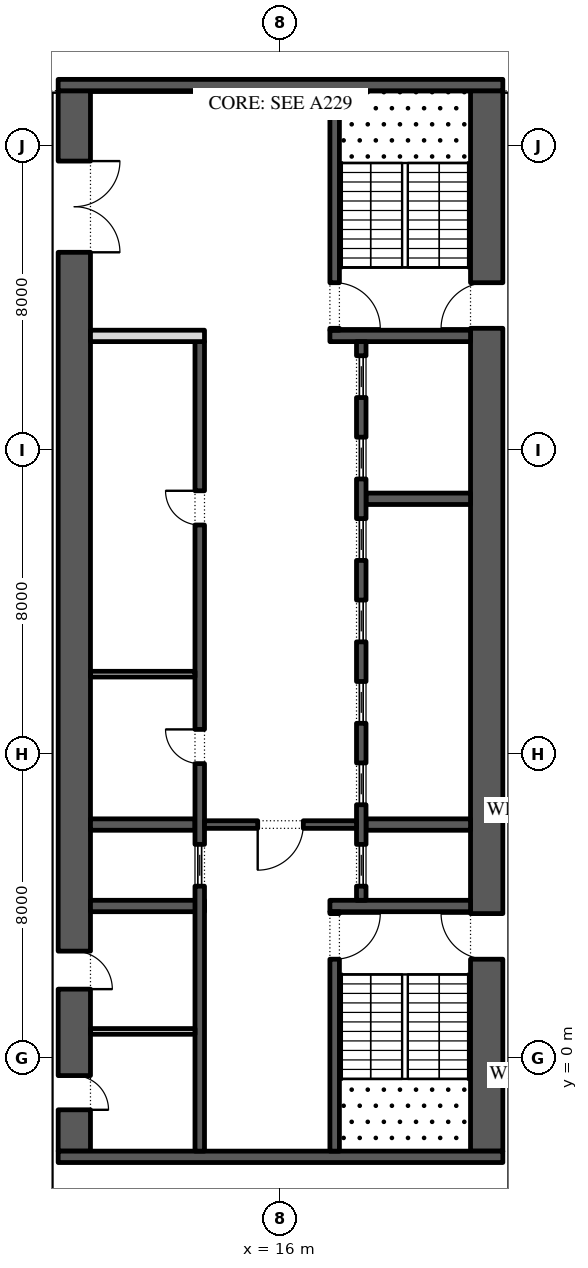
"""IFC4 building model, lengths in metres.
Left out: names, types, materials, properties, quantities, classifications, styles, units other than length and angle.
Written with IfcOpenShell. Run it as: python <this file> out.ifc"""

import sys

from ifc_helpers import new_model, si_unit, direction, frame, frame_2d, origin, place, context, subcontext, project, spatial, rectangle, extrude, element, fill, save


model = new_model("IFC4")
c1 = context("Model", 3, precision=1e-05, world=origin(), true_north=direction((0.0, 1.0)))
c2 = subcontext(c1, "Body", "Model", "MODEL_VIEW")
j1 = project(units=[si_unit("LENGTHUNIT", "METRE"), si_unit("PLANEANGLEUNIT", "RADIAN")], contexts=[c1])
p1 = place(None, origin())
s1 = spatial("IfcSite", under=j1, at=p1, CompositionType="ELEMENT")
p2 = place(p1, origin())
s2 = spatial("IfcBuilding", under=s1, at=p2, CompositionType="ELEMENT")
p3 = place(p2, frame((0.0, 0.0, 122.4)))
s3 = spatial("IfcBuildingStorey", under=s2, at=p3, CompositionType="ELEMENT", Elevation=122.4)
p4 = place(p3, frame((21.425, -2.45, 0.0), z_axis=(0.0, 0.0, 1.0), x_axis=(0.0, 1.0, 0.0)))
e1 = element("IfcWall", 1, at=p4, inside=s3, PredefinedType="SHEAR", context=c2, shape_type="SweptSolid", body=[
    extrude(rectangle(XDim=27.9, YDim=0.85, at=frame_2d((13.95, 0.0))), origin(), (0.0, 0.0, 1.0), 4.0),
])
p5 = place(p4, frame((5.05, 0.0, 0.0)))
e2 = element("IfcOpeningElement", 2, at=p5, cuts=e1, PredefinedType="OPENING", context=c2, shape_type="SweptSolid", body=[
    extrude(rectangle(XDim=1.2, YDim=2.1, at=frame_2d((0.6, 1.05))), frame((0.0, 0.435, 0.0), z_axis=(0.0, -1.0, 0.0), x_axis=(1.0, 0.0, 0.0)), (0.0, 0.0, 1.0), 0.87),
])
p6 = place(p4, frame((21.65, 0.0, 0.0)))
e3 = element("IfcOpeningElement", 3, at=p6, cuts=e1, PredefinedType="OPENING", context=c2, shape_type="SweptSolid", body=[
    extrude(rectangle(XDim=1.2, YDim=2.1, at=frame_2d((0.6, 1.05))), frame((0.0, 0.435, 0.0), z_axis=(0.0, -1.0, 0.0), x_axis=(1.0, 0.0, 0.0)), (0.0, 0.0, 1.0), 0.87),
])
p7 = place(p3, frame((10.575, -2.45, 0.0), z_axis=(0.0, 0.0, 1.0), x_axis=(0.0, 1.0, 0.0)))
e4 = element("IfcWall", 4, at=p7, inside=s3, PredefinedType="SHEAR", context=c2, shape_type="SweptSolid", body=[
    extrude(rectangle(XDim=27.9, YDim=0.85, at=frame_2d((13.95, 0.0))), origin(), (0.0, 0.0, 1.0), 4.0),
])
p8 = place(p7, frame((23.65, 0.0, 0.0)))
e5 = element("IfcOpeningElement", 5, at=p8, cuts=e4, PredefinedType="OPENING", context=c2, shape_type="SweptSolid", body=[
    extrude(rectangle(XDim=2.4, YDim=2.1, at=frame_2d((1.2, 1.05))), frame((0.0, 0.435, 0.0), z_axis=(0.0, -1.0, 0.0), x_axis=(1.0, 0.0, 0.0)), (0.0, 0.0, 1.0), 0.87),
])
p9 = place(p7, frame((1.087, 0.0, 0.0)))
e6 = element("IfcOpeningElement", 6, at=p9, cuts=e4, PredefinedType="OPENING", context=c2, shape_type="SweptSolid", body=[
    extrude(rectangle(XDim=0.9, YDim=2.1, at=frame_2d((0.45, 1.05))), frame((0.0, 0.435, 0.0), z_axis=(0.0, -1.0, 0.0), x_axis=(1.0, 0.0, 0.0)), (0.0, 0.0, 1.0), 0.87),
])
p10 = place(p7, frame((4.262, 0.0, 0.0)))
e7 = element("IfcOpeningElement", 7, at=p10, cuts=e4, PredefinedType="OPENING", context=c2, shape_type="SweptSolid", body=[
    extrude(rectangle(XDim=1.0, YDim=2.1, at=frame_2d((0.5, 1.05))), frame((0.0, 0.435, 0.0), z_axis=(0.0, -1.0, 0.0), x_axis=(1.0, 0.0, 0.0)), (0.0, 0.0, 1.0), 0.87),
])
for number, where, z_axis, x_axis in (
    (8, (10.15, -2.6, 0.0), (0.0, 0.0, 1.0), (1.0, 0.0, 0.0)),
    (9, (10.15, 25.6, 0.0), (0.0, 0.0, 1.0), (1.0, 0.0, 0.0)),
):
    element("IfcWall", number, at=place(p3, frame(where, z_axis=z_axis, x_axis=x_axis)), inside=s3, PredefinedType="SHEAR", context=c2, shape_type="SweptSolid", body=[
        extrude(rectangle(XDim=11.7, YDim=0.3, at=frame_2d((5.85, 0.0))), origin(), (0.0, 0.0, 1.0), 4.0),
    ])
p11 = place(p3, frame((17.3, 4.0, 0.0), z_axis=(0.0, 0.0, 1.0), x_axis=(1.0, 0.0, 0.0)))
e10 = element("IfcWall", 10, at=p11, inside=s3, PredefinedType="SHEAR", context=c2, shape_type="SweptSolid", body=[
    extrude(rectangle(XDim=3.7, YDim=0.3, at=frame_2d((1.85, 0.0))), origin(), (0.0, 0.0, 1.0), 4.0),
])
p12 = place(p3, frame((17.425, -2.45, 0.0), z_axis=(0.0, 0.0, 1.0), x_axis=(0.0, 1.0, 0.0)))
e11 = element("IfcWall", 11, at=p12, inside=s3, PredefinedType="SHEAR", context=c2, shape_type="SweptSolid", body=[
    extrude(rectangle(XDim=6.3, YDim=0.25, at=frame_2d((3.15, 0.0))), origin(), (0.0, 0.0, 1.0), 4.0),
])
p13 = place(p12, frame((5.05, 0.0, 0.0)))
e12 = element("IfcOpeningElement", 12, at=p13, cuts=e11, PredefinedType="OPENING", context=c2, shape_type="SweptSolid", body=[
    extrude(rectangle(XDim=1.2, YDim=2.1, at=frame_2d((0.6, 1.05))), frame((0.0, 0.135, 0.0), z_axis=(0.0, -1.0, 0.0), x_axis=(1.0, 0.0, 0.0)), (0.0, 0.0, 1.0), 0.27),
])
p14 = place(p3, frame((17.3, 19.0, 0.0), z_axis=(0.0, 0.0, 1.0), x_axis=(1.0, 0.0, 0.0)))
e13 = element("IfcWall", 13, at=p14, inside=s3, PredefinedType="SHEAR", context=c2, shape_type="SweptSolid", body=[
    extrude(rectangle(XDim=3.7, YDim=0.3, at=frame_2d((1.85, 0.0))), origin(), (0.0, 0.0, 1.0), 4.0),
])
p15 = place(p3, frame((17.425, 19.15, 0.0), z_axis=(0.0, 0.0, 1.0), x_axis=(0.0, 1.0, 0.0)))
e14 = element("IfcWall", 14, at=p15, inside=s3, PredefinedType="SHEAR", context=c2, shape_type="SweptSolid", body=[
    extrude(rectangle(XDim=6.3, YDim=0.25, at=frame_2d((3.15, 0.0))), origin(), (0.0, 0.0, 1.0), 4.0),
])
p16 = place(p15, frame((0.05, 0.0, 0.0)))
e15 = element("IfcOpeningElement", 15, at=p16, cuts=e14, PredefinedType="OPENING", context=c2, shape_type="SweptSolid", body=[
    extrude(rectangle(XDim=1.2, YDim=2.1, at=frame_2d((0.6, 1.05))), frame((0.0, 0.135, 0.0), z_axis=(0.0, -1.0, 0.0), x_axis=(1.0, 0.0, 0.0)), (0.0, 0.0, 1.0), 0.27),
])
for number, where, z_axis, x_axis in (
    (16, (18.25, 6.143, 0.0), (0.0, 0.0, 1.0), (1.0, 0.0, 0.0)),
    (17, (18.25, 14.714, 0.0), (0.0, 0.0, 1.0), (1.0, 0.0, 0.0)),
):
    element("IfcWall", number, at=place(p3, frame(where, z_axis=z_axis, x_axis=x_axis)), inside=s3, PredefinedType="SHEAR", context=c2, shape_type="SweptSolid", body=[
        extrude(rectangle(XDim=2.75, YDim=0.3, at=frame_2d((1.375, 0.0))), origin(), (0.0, 0.0, 1.0), 4.0),
    ])
p17 = place(p3, frame((18.125, 4.15, 0.0), z_axis=(0.0, 0.0, 1.0), x_axis=(0.0, 1.0, 0.0)))
e18 = element("IfcWall", 18, at=p17, inside=s3, PredefinedType="SHEAR", context=c2, shape_type="SweptSolid", body=[
    extrude(rectangle(XDim=14.7, YDim=0.25, at=frame_2d((7.35, 0.0))), origin(), (0.0, 0.0, 1.0), 4.0),
])
p18 = place(p17, frame((0.371, 0.0, 0.0)))
e19 = element("IfcOpeningElement", 19, at=p18, cuts=e18, PredefinedType="OPENING", context=c2, shape_type="SweptSolid", body=[
    extrude(rectangle(XDim=1.1, YDim=2.1, at=frame_2d((0.55, 1.05))), frame((0.0, 0.135, 0.0), z_axis=(0.0, -1.0, 0.0), x_axis=(1.0, 0.0, 0.0)), (0.0, 0.0, 1.0), 0.27),
])
p19 = place(p17, frame((2.514, 0.0, 0.0)))
e20 = element("IfcOpeningElement", 20, at=p19, cuts=e18, PredefinedType="OPENING", context=c2, shape_type="SweptSolid", body=[
    extrude(rectangle(XDim=1.1, YDim=2.1, at=frame_2d((0.55, 1.05))), frame((0.0, 0.135, 0.0), z_axis=(0.0, -1.0, 0.0), x_axis=(1.0, 0.0, 0.0)), (0.0, 0.0, 1.0), 0.27),
])
p20 = place(p17, frame((4.657, 0.0, 0.0)))
e21 = element("IfcOpeningElement", 21, at=p20, cuts=e18, PredefinedType="OPENING", context=c2, shape_type="SweptSolid", body=[
    extrude(rectangle(XDim=1.1, YDim=2.1, at=frame_2d((0.55, 1.05))), frame((0.0, 0.135, 0.0), z_axis=(0.0, -1.0, 0.0), x_axis=(1.0, 0.0, 0.0)), (0.0, 0.0, 1.0), 0.27),
])
p21 = place(p17, frame((6.8, 0.0, 0.0)))
e22 = element("IfcOpeningElement", 22, at=p21, cuts=e18, PredefinedType="OPENING", context=c2, shape_type="SweptSolid", body=[
    extrude(rectangle(XDim=1.1, YDim=2.1, at=frame_2d((0.55, 1.05))), frame((0.0, 0.135, 0.0), z_axis=(0.0, -1.0, 0.0), x_axis=(1.0, 0.0, 0.0)), (0.0, 0.0, 1.0), 0.27),
])
p22 = place(p17, frame((8.943, 0.0, 0.0)))
e23 = element("IfcOpeningElement", 23, at=p22, cuts=e18, PredefinedType="OPENING", context=c2, shape_type="SweptSolid", body=[
    extrude(rectangle(XDim=1.1, YDim=2.1, at=frame_2d((0.55, 1.05))), frame((0.0, 0.135, 0.0), z_axis=(0.0, -1.0, 0.0), x_axis=(1.0, 0.0, 0.0)), (0.0, 0.0, 1.0), 0.27),
])
p23 = place(p17, frame((11.086, 0.0, 0.0)))
e24 = element("IfcOpeningElement", 24, at=p23, cuts=e18, PredefinedType="OPENING", context=c2, shape_type="SweptSolid", body=[
    extrude(rectangle(XDim=1.1, YDim=2.1, at=frame_2d((0.55, 1.05))), frame((0.0, 0.135, 0.0), z_axis=(0.0, -1.0, 0.0), x_axis=(1.0, 0.0, 0.0)), (0.0, 0.0, 1.0), 0.27),
])
p24 = place(p17, frame((13.229, 0.0, 0.0)))
e25 = element("IfcOpeningElement", 25, at=p24, cuts=e18, PredefinedType="OPENING", context=c2, shape_type="SweptSolid", body=[
    extrude(rectangle(XDim=1.1, YDim=2.1, at=frame_2d((0.55, 1.05))), frame((0.0, 0.135, 0.0), z_axis=(0.0, -1.0, 0.0), x_axis=(1.0, 0.0, 0.0)), (0.0, 0.0, 1.0), 0.27),
])
p25 = place(p3, frame((11.0, 4.0, 0.0), z_axis=(0.0, 0.0, 1.0), x_axis=(1.0, 0.0, 0.0)))
e26 = element("IfcWall", 26, at=p25, inside=s3, PredefinedType="SHEAR", context=c2, shape_type="SweptSolid", body=[
    extrude(rectangle(XDim=3.0, YDim=0.3, at=frame_2d((1.5, 0.0))), origin(), (0.0, 0.0, 1.0), 4.0),
])
p26 = place(p3, frame((11.0, 6.143, 0.0), z_axis=(0.0, 0.0, 1.0), x_axis=(1.0, 0.0, 0.0)))
e27 = element("IfcWall", 27, at=p26, inside=s3, PredefinedType="SHEAR", context=c2, shape_type="SweptSolid", body=[
    extrude(rectangle(XDim=2.75, YDim=0.3, at=frame_2d((1.375, 0.0))), origin(), (0.0, 0.0, 1.0), 4.0),
])
p27 = place(p3, frame((13.875, -2.45, 0.0), z_axis=(0.0, 0.0, 1.0), x_axis=(0.0, 1.0, 0.0)))
e28 = element("IfcWall", 28, at=p27, inside=s3, PredefinedType="SHEAR", context=c2, shape_type="SweptSolid", body=[
    extrude(rectangle(XDim=21.3, YDim=0.25, at=frame_2d((10.65, 0.0))), origin(), (0.0, 0.0, 1.0), 4.0),
])
p28 = place(p27, frame((10.196, 0.0, 0.0)))
e29 = element("IfcOpeningElement", 29, at=p28, cuts=e28, PredefinedType="OPENING", context=c2, shape_type="SweptSolid", body=[
    extrude(rectangle(XDim=0.9, YDim=2.1, at=frame_2d((0.45, 1.05))), frame((0.0, 0.135, 0.0), z_axis=(0.0, -1.0, 0.0), x_axis=(1.0, 0.0, 0.0)), (0.0, 0.0, 1.0), 0.27),
])
p29 = place(p27, frame((16.475, 0.0, 0.0)))
e30 = element("IfcOpeningElement", 30, at=p29, cuts=e28, PredefinedType="OPENING", context=c2, shape_type="SweptSolid", body=[
    extrude(rectangle(XDim=0.9, YDim=2.1, at=frame_2d((0.45, 1.05))), frame((0.0, 0.135, 0.0), z_axis=(0.0, -1.0, 0.0), x_axis=(1.0, 0.0, 0.0)), (0.0, 0.0, 1.0), 0.27),
])
p30 = place(p27, frame((6.971, 0.0, 0.0)))
e31 = element("IfcOpeningElement", 31, at=p30, cuts=e28, PredefinedType="OPENING", context=c2, shape_type="SweptSolid", body=[
    extrude(rectangle(XDim=1.1, YDim=2.1, at=frame_2d((0.55, 1.05))), frame((0.0, 0.135, 0.0), z_axis=(0.0, -1.0, 0.0), x_axis=(1.0, 0.0, 0.0)), (0.0, 0.0, 1.0), 0.27),
])
p31 = place(p3, frame((11.0, 19.0, 0.0), z_axis=(0.0, 0.0, 1.0), x_axis=(1.0, 0.0, 0.0)))
e32 = element("IfcWall", 32, at=p31, inside=s3, PredefinedType="PARTITIONING", context=c2, shape_type="SweptSolid", body=[
    extrude(rectangle(XDim=3.0, YDim=0.3, at=frame_2d((1.5, 0.0))), origin(), (0.0, 0.0, 1.0), 4.0),
])
p32 = place(p3, frame((11.0, 10.1, 0.0), z_axis=(0.0, 0.0, 1.0), x_axis=(1.0, 0.0, 0.0)))
e33 = element("IfcWall", 33, at=p32, inside=s3, PredefinedType="PARTITIONING", context=c2, shape_type="SweptSolid", body=[
    extrude(rectangle(XDim=2.75, YDim=0.15, at=frame_2d((1.375, 0.0))), origin(), (0.0, 0.0, 1.0), 4.0),
])
p33 = place(p3, frame((14.0, 6.143, 0.0), z_axis=(0.0, 0.0, 1.0), x_axis=(1.0, 0.0, 0.0)))
e34 = element("IfcWall", 34, at=p33, inside=s3, PredefinedType="SHEAR", context=c2, shape_type="SweptSolid", body=[
    extrude(rectangle(XDim=4.0, YDim=0.2, at=frame_2d((2.0, 0.0))), origin(), (0.0, 0.0, 1.0), 4.0),
])
p34 = place(p33, frame((1.4, 0.0, 0.0)))
e35 = element("IfcOpeningElement", 35, at=p34, cuts=e34, PredefinedType="OPENING", context=c2, shape_type="SweptSolid", body=[
    extrude(rectangle(XDim=1.2, YDim=2.1, at=frame_2d((0.6, 1.05))), frame((0.0, 0.11, 0.0), z_axis=(0.0, -1.0, 0.0), x_axis=(1.0, 0.0, 0.0)), (0.0, 0.0, 1.0), 0.22),
])
p35 = place(p3, frame((11.0, 0.7, 0.0), z_axis=(0.0, 0.0, 1.0), x_axis=(1.0, 0.0, 0.0)))
e36 = element("IfcWall", 36, at=p35, inside=s3, PredefinedType="PARTITIONING", context=c2, shape_type="SweptSolid", body=[
    extrude(rectangle(XDim=2.75, YDim=0.15, at=frame_2d((1.375, 0.0))), origin(), (0.0, 0.0, 1.0), 4.0),
])
p36 = place(p18, origin())
e37 = element("IfcDoor", 37, at=p36, inside=s3, OperationType="SLIDING_TO_LEFT", PredefinedType="DOOR", context=c2, shape_type="SweptSolid", body=[
    extrude(rectangle(XDim=1.1, YDim=2.1, at=frame_2d((0.55, 1.05))), frame((0.0, 0.025, 0.0), z_axis=(0.0, -1.0, 0.0), x_axis=(1.0, 0.0, 0.0)), (0.0, 0.0, 1.0), 0.05),
])
fill(e19, e37)
p37 = place(p19, origin())
e38 = element("IfcDoor", 38, at=p37, inside=s3, OperationType="SLIDING_TO_LEFT", PredefinedType="DOOR", context=c2, shape_type="SweptSolid", body=[
    extrude(rectangle(XDim=1.1, YDim=2.1, at=frame_2d((0.55, 1.05))), frame((0.0, 0.025, 0.0), z_axis=(0.0, -1.0, 0.0), x_axis=(1.0, 0.0, 0.0)), (0.0, 0.0, 1.0), 0.05),
])
fill(e20, e38)
p38 = place(p20, origin())
e39 = element("IfcDoor", 39, at=p38, inside=s3, OperationType="SLIDING_TO_LEFT", PredefinedType="DOOR", context=c2, shape_type="SweptSolid", body=[
    extrude(rectangle(XDim=1.1, YDim=2.1, at=frame_2d((0.55, 1.05))), frame((0.0, 0.025, 0.0), z_axis=(0.0, -1.0, 0.0), x_axis=(1.0, 0.0, 0.0)), (0.0, 0.0, 1.0), 0.05),
])
fill(e21, e39)
p39 = place(p21, origin())
e40 = element("IfcDoor", 40, at=p39, inside=s3, OperationType="SLIDING_TO_LEFT", PredefinedType="DOOR", context=c2, shape_type="SweptSolid", body=[
    extrude(rectangle(XDim=1.1, YDim=2.1, at=frame_2d((0.55, 1.05))), frame((0.0, 0.025, 0.0), z_axis=(0.0, -1.0, 0.0), x_axis=(1.0, 0.0, 0.0)), (0.0, 0.0, 1.0), 0.05),
])
fill(e22, e40)
p40 = place(p22, origin())
e41 = element("IfcDoor", 41, at=p40, inside=s3, OperationType="SLIDING_TO_LEFT", PredefinedType="DOOR", context=c2, shape_type="SweptSolid", body=[
    extrude(rectangle(XDim=1.1, YDim=2.1, at=frame_2d((0.55, 1.05))), frame((0.0, 0.025, 0.0), z_axis=(0.0, -1.0, 0.0), x_axis=(1.0, 0.0, 0.0)), (0.0, 0.0, 1.0), 0.05),
])
fill(e23, e41)
p41 = place(p23, origin())
e42 = element("IfcDoor", 42, at=p41, inside=s3, OperationType="SLIDING_TO_LEFT", PredefinedType="DOOR", context=c2, shape_type="SweptSolid", body=[
    extrude(rectangle(XDim=1.1, YDim=2.1, at=frame_2d((0.55, 1.05))), frame((0.0, 0.025, 0.0), z_axis=(0.0, -1.0, 0.0), x_axis=(1.0, 0.0, 0.0)), (0.0, 0.0, 1.0), 0.05),
])
fill(e24, e42)
p42 = place(p24, origin())
e43 = element("IfcDoor", 43, at=p42, inside=s3, OperationType="SLIDING_TO_LEFT", PredefinedType="DOOR", context=c2, shape_type="SweptSolid", body=[
    extrude(rectangle(XDim=1.1, YDim=2.1, at=frame_2d((0.55, 1.05))), frame((0.0, 0.025, 0.0), z_axis=(0.0, -1.0, 0.0), x_axis=(1.0, 0.0, 0.0)), (0.0, 0.0, 1.0), 0.05),
])
fill(e25, e43)
p43 = place(p28, origin())
e44 = element("IfcDoor", 44, at=p43, inside=s3, OperationType="SINGLE_SWING_LEFT", PredefinedType="DOOR", context=c2, shape_type="SweptSolid", body=[
    extrude(rectangle(XDim=0.9, YDim=2.1, at=frame_2d((0.45, 1.05))), frame((0.0, 0.125, 0.0), z_axis=(0.0, -1.0, 0.0), x_axis=(1.0, 0.0, 0.0)), (0.0, 0.0, 1.0), 0.05),
])
fill(e29, e44)
p44 = place(p29, origin())
e45 = element("IfcDoor", 45, at=p44, inside=s3, OperationType="SINGLE_SWING_LEFT", PredefinedType="DOOR", context=c2, shape_type="SweptSolid", body=[
    extrude(rectangle(XDim=0.9, YDim=2.1, at=frame_2d((0.45, 1.05))), frame((0.0, 0.125, 0.0), z_axis=(0.0, -1.0, 0.0), x_axis=(1.0, 0.0, 0.0)), (0.0, 0.0, 1.0), 0.05),
])
fill(e30, e45)
p45 = place(p30, origin())
e46 = element("IfcDoor", 46, at=p45, inside=s3, OperationType="SLIDING_TO_LEFT", PredefinedType="DOOR", context=c2, shape_type="SweptSolid", body=[
    extrude(rectangle(XDim=1.1, YDim=2.1, at=frame_2d((0.55, 1.05))), frame((0.0, 0.025, 0.0), z_axis=(0.0, -1.0, 0.0), x_axis=(1.0, 0.0, 0.0)), (0.0, 0.0, 1.0), 0.05),
])
fill(e31, e46)
p46 = place(p34, frame((1.2, 0.0, 0.0), z_axis=(0.0, 0.0, 1.0), x_axis=(-1.0, 0.0, 0.0)))
e47 = element("IfcDoor", 47, at=p46, inside=s3, OperationType="SINGLE_SWING_LEFT", PredefinedType="DOOR", context=c2, shape_type="SweptSolid", body=[
    extrude(rectangle(XDim=1.2, YDim=2.1, at=frame_2d((0.6, 1.05))), frame((0.0, 0.025, 0.0), z_axis=(0.0, -1.0, 0.0), x_axis=(1.0, 0.0, 0.0)), (0.0, 0.0, 1.0), 0.05),
])
fill(e35, e47)
p47 = place(p8, frame((2.4, 0.0, 0.0), z_axis=(0.0, 0.0, 1.0), x_axis=(-1.0, 0.0, 0.0)))
e48 = element("IfcDoor", 48, at=p47, inside=s3, OperationType="DOUBLE_DOOR_SINGLE_SWING", PredefinedType="DOOR", context=c2, shape_type="SweptSolid", body=[
    extrude(rectangle(XDim=2.4, YDim=2.1, at=frame_2d((1.2, 1.05))), frame((0.0, 0.025, 0.0), z_axis=(0.0, -1.0, 0.0), x_axis=(1.0, 0.0, 0.0)), (0.0, 0.0, 1.0), 0.05),
])
fill(e5, e48)
p48 = place(p13, frame((1.2, 0.0, 0.0), z_axis=(0.0, 0.0, 1.0), x_axis=(-1.0, 0.0, 0.0)))
e49 = element("IfcDoor", 49, at=p48, inside=s3, OperationType="SINGLE_SWING_RIGHT", PredefinedType="DOOR", context=c2, shape_type="SweptSolid", body=[
    extrude(rectangle(XDim=1.2, YDim=2.1, at=frame_2d((0.6, 1.05))), frame((0.0, 0.025, 0.0), z_axis=(0.0, -1.0, 0.0), x_axis=(1.0, 0.0, 0.0)), (0.0, 0.0, 1.0), 0.05),
])
fill(e12, e49)
p49 = place(p5, origin())
e50 = element("IfcDoor", 50, at=p49, inside=s3, OperationType="SINGLE_SWING_LEFT", PredefinedType="DOOR", context=c2, shape_type="SweptSolid", body=[
    extrude(rectangle(XDim=1.2, YDim=2.1, at=frame_2d((0.6, 1.05))), frame((0.0, 0.025, 0.0), z_axis=(0.0, -1.0, 0.0), x_axis=(1.0, 0.0, 0.0)), (0.0, 0.0, 1.0), 0.05),
])
fill(e2, e50)
p50 = place(p16, frame((1.2, 0.0, 0.0), z_axis=(0.0, 0.0, 1.0), x_axis=(-1.0, 0.0, 0.0)))
e51 = element("IfcDoor", 51, at=p50, inside=s3, OperationType="SINGLE_SWING_LEFT", PredefinedType="DOOR", context=c2, shape_type="SweptSolid", body=[
    extrude(rectangle(XDim=1.2, YDim=2.1, at=frame_2d((0.6, 1.05))), frame((0.0, 0.025, 0.0), z_axis=(0.0, -1.0, 0.0), x_axis=(1.0, 0.0, 0.0)), (0.0, 0.0, 1.0), 0.05),
])
fill(e15, e51)
p51 = place(p6, origin())
e52 = element("IfcDoor", 52, at=p51, inside=s3, OperationType="SINGLE_SWING_RIGHT", PredefinedType="DOOR", context=c2, shape_type="SweptSolid", body=[
    extrude(rectangle(XDim=1.2, YDim=2.1, at=frame_2d((0.6, 1.05))), frame((0.0, 0.025, 0.0), z_axis=(0.0, -1.0, 0.0), x_axis=(1.0, 0.0, 0.0)), (0.0, 0.0, 1.0), 0.05),
])
fill(e3, e52)
p52 = place(p9, frame((0.9, -0.8, 0.0), z_axis=(0.0, 0.0, 1.0), x_axis=(-1.0, 0.0, 0.0)))
e53 = element("IfcDoor", 53, at=p52, inside=s3, OperationType="SINGLE_SWING_LEFT", PredefinedType="DOOR", context=c2, shape_type="SweptSolid", body=[
    extrude(rectangle(XDim=0.9, YDim=2.1, at=frame_2d((0.45, 1.05))), frame((0.0, -0.375, 0.0), z_axis=(0.0, -1.0, 0.0), x_axis=(1.0, 0.0, 0.0)), (0.0, 0.0, 1.0), 0.05),
])
fill(e6, e53)
p53 = place(p10, frame((1.0, -0.8, 0.0), z_axis=(0.0, 0.0, 1.0), x_axis=(-1.0, 0.0, 0.0)))
e54 = element("IfcDoor", 54, at=p53, inside=s3, OperationType="SINGLE_SWING_LEFT", PredefinedType="DOOR", context=c2, shape_type="SweptSolid", body=[
    extrude(rectangle(XDim=1.0, YDim=2.1, at=frame_2d((0.5, 1.05))), frame((0.0, -0.375, 0.0), z_axis=(0.0, -1.0, 0.0), x_axis=(1.0, 0.0, 0.0)), (0.0, 0.0, 1.0), 0.05),
])
fill(e7, e54)
save(model, sys.argv[1])
